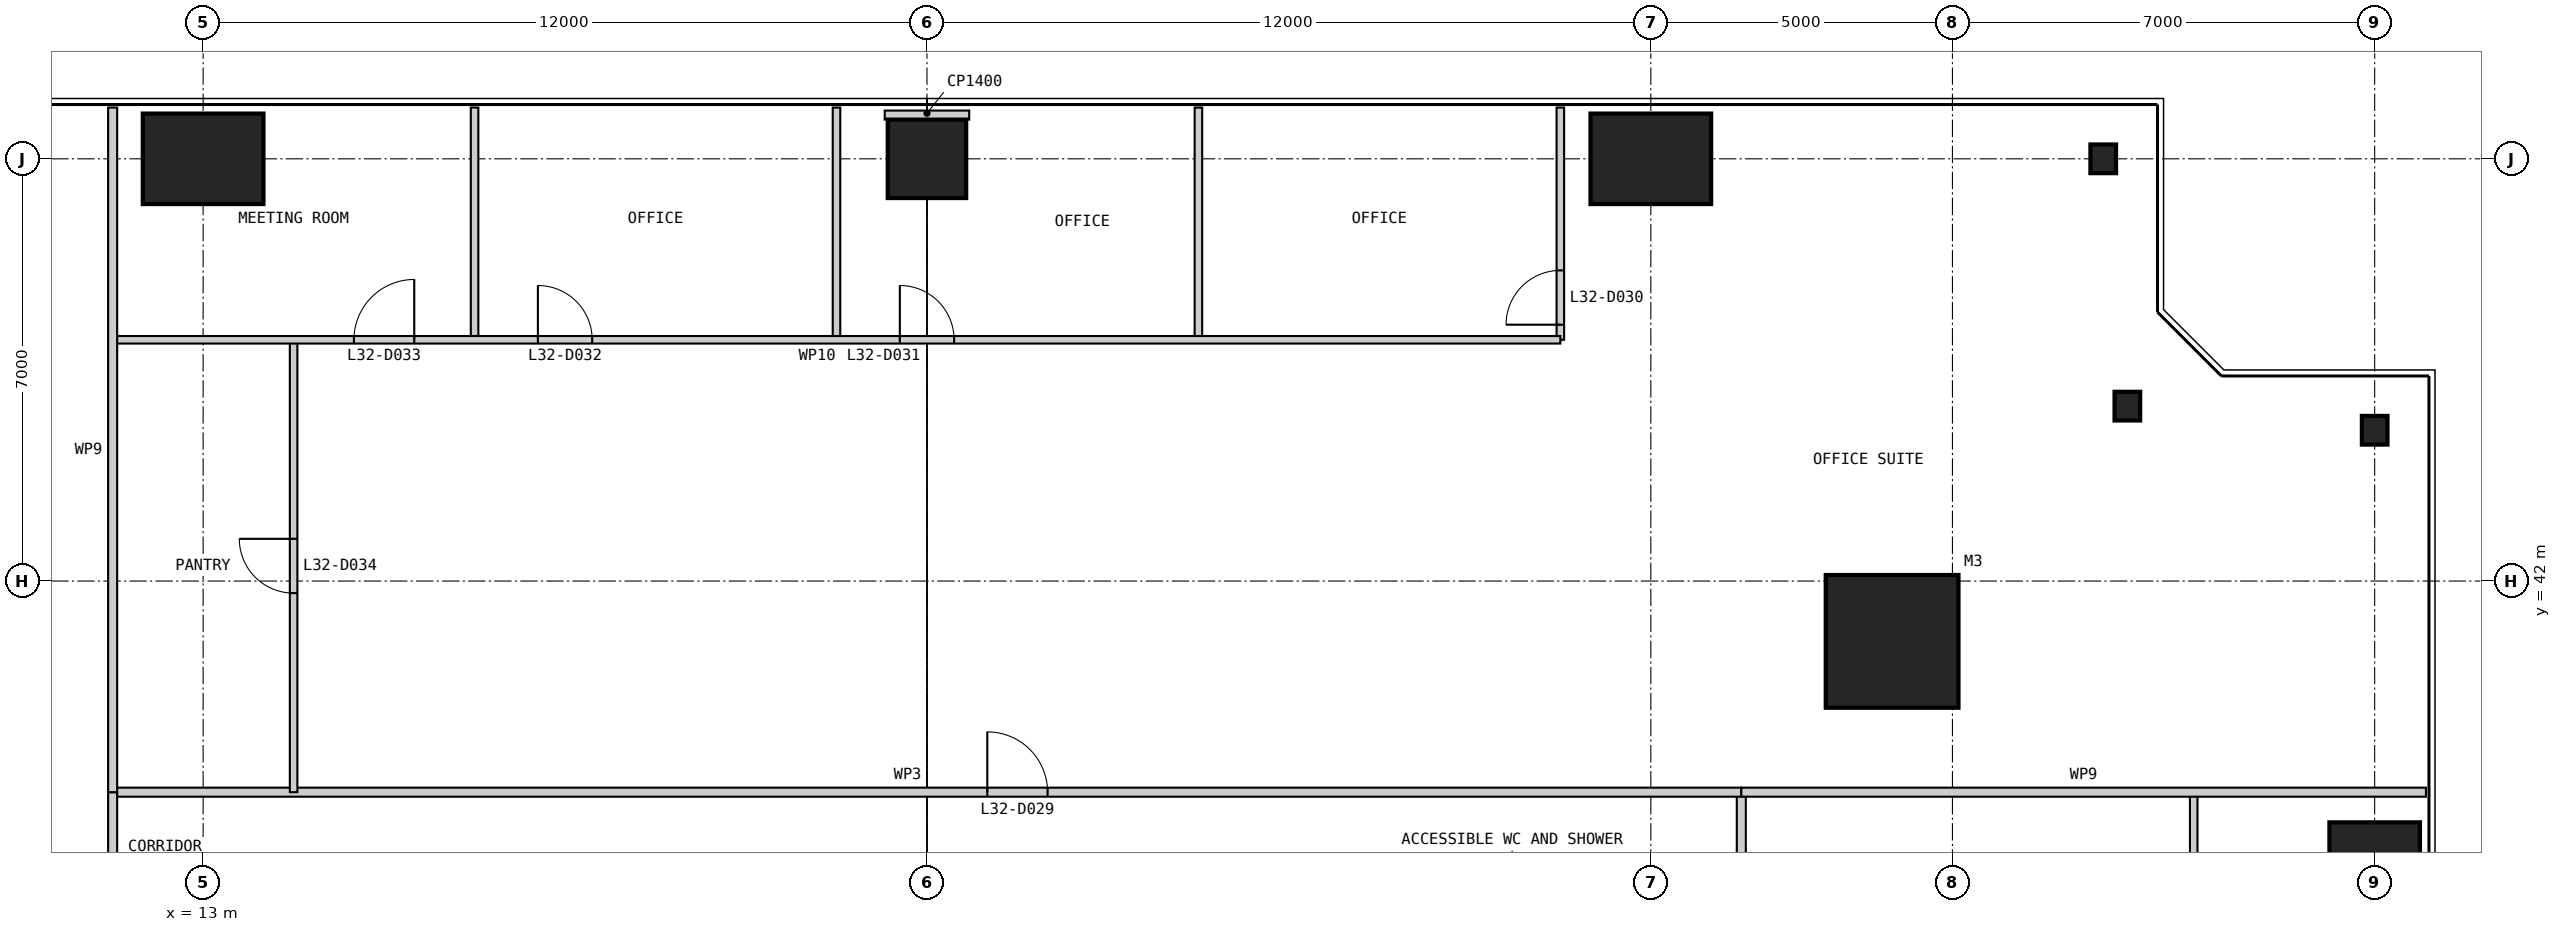
"""IFC4 building model, lengths in metres.
Left out: names, types, materials, properties, quantities, classifications, styles, units other than length and angle.
Written with IfcOpenShell. Run it as: python <this file> out.ifc"""

import sys

from ifc_helpers import new_model, si_unit, direction, frame, frame_2d, origin, origin_2d, place, context, subcontext, project, spatial, rectangle, i_section, extrude, element, fill, save


model = new_model("IFC4")
c1 = context("Model", 3, precision=1e-05, world=origin(), true_north=direction((0.0, 1.0)))
c2 = subcontext(c1, "Body", "Model", "MODEL_VIEW")
j1 = project(units=[si_unit("LENGTHUNIT", "METRE"), si_unit("PLANEANGLEUNIT", "RADIAN")], contexts=[c1])
p1 = place(None, origin())
s1 = spatial("IfcSite", under=j1, at=p1, CompositionType="ELEMENT")
p2 = place(p1, origin())
s2 = spatial("IfcBuilding", under=s1, at=p2, CompositionType="ELEMENT")
p3 = place(p2, frame((0.0, 0.0, 138.4)))
s3 = spatial("IfcBuildingStorey", under=s2, at=p3, CompositionType="ELEMENT", Elevation=138.4)
p4 = place(p3, frame((41.0, 41.0, 0.0), z_axis=(0.0, 0.0, 1.0), x_axis=(1.0, 0.0, 0.0)))
e1 = element("IfcColumn", 1, at=p4, inside=s3, PredefinedType="COLUMN", context=c2, shape_type="SweptSolid", body=[
    extrude(rectangle(XDim=2.2, YDim=2.2, at=origin_2d()), origin(), (0.0, 0.0, 1.0), 4.0),
])
p5 = place(p3, frame((49.0, 37.0, 0.0), z_axis=(0.0, 0.0, 1.0), x_axis=(1.0, 0.0, 0.0)))
e2 = element("IfcColumn", 2, at=p5, inside=s3, PredefinedType="COLUMN", context=c2, shape_type="SweptSolid", body=[
    extrude(rectangle(XDim=1.5, YDim=2.0, at=origin_2d()), origin(), (0.0, 0.0, 1.0), 4.0),
])
for number, where, z_axis, x_axis in (
    (3, (49.0, 44.5, 0.0), (0.0, 0.0, 1.0), (1.0, 0.0, 0.0)),
    (4, (44.9, 44.9, 0.0), (0.0, 0.0, 1.0), (1.0, 0.0, 0.0)),
    (5, (44.5, 49.0, 0.0), (0.0, 0.0, 1.0), (1.0, 0.0, 0.0)),
):
    element("IfcColumn", number, at=place(p3, frame(where, z_axis=z_axis, x_axis=x_axis)), inside=s3, PredefinedType="COLUMN", context=c2, shape_type="SweptSolid", body=[
        extrude(i_section(OverallWidth=0.424, OverallDepth=0.475, WebThickness=0.048, FlangeThickness=0.077, at=origin_2d()), origin(), (0.0, 0.0, 1.0), 4.0),
    ])
p6 = place(p3, frame((37.0, 49.0, 0.0), z_axis=(0.0, 0.0, 1.0), x_axis=(1.0, 0.0, 0.0)))
e6 = element("IfcColumn", 6, at=p6, inside=s3, PredefinedType="COLUMN", context=c2, shape_type="SweptSolid", body=[
    extrude(rectangle(XDim=2.0, YDim=1.5, at=origin_2d()), origin(), (0.0, 0.0, 1.0), 4.0),
])
p7 = place(p3, frame((25.0, 49.0, 0.0), z_axis=(0.0, 0.0, 1.0), x_axis=(1.0, 0.0, 0.0)))
e7 = element("IfcColumn", 7, at=p7, inside=s3, PredefinedType="COLUMN", context=c2, shape_type="SweptSolid", body=[
    extrude(rectangle(XDim=1.3, YDim=1.3, at=origin_2d()), origin(), (0.0, 0.0, 1.0), 4.0),
])
p8 = place(p3, frame((13.0, 49.0, 0.0), z_axis=(0.0, 0.0, 1.0), x_axis=(1.0, 0.0, 0.0)))
e8 = element("IfcColumn", 8, at=p8, inside=s3, PredefinedType="COLUMN", context=c2, shape_type="SweptSolid", body=[
    extrude(rectangle(XDim=2.0, YDim=1.5, at=origin_2d()), origin(), (0.0, 0.0, 1.0), 4.0),
])
p9 = place(p3, frame((38.5, 11.5, 0.0), z_axis=(0.0, 0.0, 1.0), x_axis=(0.0, 1.0, 0.0)))
e9 = element("IfcWall", 9, at=p9, inside=s3, PredefinedType="PARTITIONING", context=c2, shape_type="SweptSolid", body=[
    extrude(rectangle(XDim=27.0, YDim=0.15, at=frame_2d((13.5, 0.0))), origin(), (0.0, 0.0, 1.0), 3.85),
])
p10 = place(p9, frame((13.0, 0.0, 0.0)))
e10 = element("IfcOpeningElement", 10, at=p10, cuts=e9, PredefinedType="OPENING", context=c2, shape_type="SweptSolid", body=[
    extrude(rectangle(XDim=1.0, YDim=2.2, at=frame_2d((0.5, 1.1))), frame((0.0, 0.085, 0.0), z_axis=(0.0, -1.0, 0.0), x_axis=(1.0, 0.0, 0.0)), (0.0, 0.0, 1.0), 0.17),
])
p11 = place(p3, frame((46.0, 14.5, 0.0), z_axis=(0.0, 0.0, 1.0), x_axis=(0.0, 1.0, 0.0)))
e11 = element("IfcWall", 11, at=p11, inside=s3, PredefinedType="PARTITIONING", context=c2, shape_type="SweptSolid", body=[
    extrude(rectangle(XDim=24.0, YDim=0.125, at=frame_2d((12.0, 0.0))), origin(), (0.0, 0.0, 1.0), 3.238),
])
p12 = place(p11, frame((4.05, 0.0, 0.0)))
e12 = element("IfcOpeningElement", 12, at=p12, cuts=e11, PredefinedType="OPENING", context=c2, shape_type="SweptSolid", body=[
    extrude(rectangle(XDim=0.9, YDim=2.2, at=frame_2d((0.45, 1.1))), frame((0.0, 0.073, 0.0), z_axis=(0.0, -1.0, 0.0), x_axis=(1.0, 0.0, 0.0)), (0.0, 0.0, 1.0), 0.145),
])
p13 = place(p11, frame((10.05, 0.0, 0.0)))
e13 = element("IfcOpeningElement", 13, at=p13, cuts=e11, PredefinedType="OPENING", context=c2, shape_type="SweptSolid", body=[
    extrude(rectangle(XDim=0.9, YDim=2.2, at=frame_2d((0.45, 1.1))), frame((0.0, 0.073, 0.0), z_axis=(0.0, -1.0, 0.0), x_axis=(1.0, 0.0, 0.0)), (0.0, 0.0, 1.0), 0.145),
])
p14 = place(p11, frame((16.05, 0.0, 0.0)))
e14 = element("IfcOpeningElement", 14, at=p14, cuts=e11, PredefinedType="OPENING", context=c2, shape_type="SweptSolid", body=[
    extrude(rectangle(XDim=0.9, YDim=2.2, at=frame_2d((0.45, 1.1))), frame((0.0, 0.073, 0.0), z_axis=(0.0, -1.0, 0.0), x_axis=(1.0, 0.0, 0.0)), (0.0, 0.0, 1.0), 0.145),
])
p15 = place(p11, frame((19.05, 0.0, 0.0)))
e15 = element("IfcOpeningElement", 15, at=p15, cuts=e11, PredefinedType="OPENING", context=c2, shape_type="SweptSolid", body=[
    extrude(rectangle(XDim=0.9, YDim=2.2, at=frame_2d((0.45, 1.1))), frame((0.0, 0.073, 0.0), z_axis=(0.0, -1.0, 0.0), x_axis=(1.0, 0.0, 0.0)), (0.0, 0.0, 1.0), 0.145),
])
p16 = place(p3, frame((38.5, 38.5, 0.0), z_axis=(0.0, 0.0, 1.0), x_axis=(-1.0, 0.0, 0.0)))
e16 = element("IfcWall", 16, at=p16, inside=s3, PredefinedType="PARTITIONING", context=c2, shape_type="SweptSolid", body=[
    extrude(rectangle(XDim=27.0, YDim=0.15, at=frame_2d((13.5, 0.0))), origin(), (0.0, 0.0, 1.0), 3.85),
])
p17 = place(p16, frame((11.5, 0.0, 0.0)))
e17 = element("IfcOpeningElement", 17, at=p17, cuts=e16, PredefinedType="OPENING", context=c2, shape_type="SweptSolid", body=[
    extrude(rectangle(XDim=1.0, YDim=2.2, at=frame_2d((0.5, 1.1))), frame((0.0, 0.085, 0.0), z_axis=(0.0, -1.0, 0.0), x_axis=(1.0, 0.0, 0.0)), (0.0, 0.0, 1.0), 0.17),
])
p18 = place(p3, frame((49.85, 38.5, 0.0), z_axis=(0.0, 0.0, 1.0), x_axis=(-1.0, 0.0, 0.0)))
e18 = element("IfcWall", 18, at=p18, inside=s3, PredefinedType="PARTITIONING", context=c2, shape_type="SweptSolid", body=[
    extrude(rectangle(XDim=11.35, YDim=0.15, at=frame_2d((5.675, 0.0))), origin(), (0.0, 0.0, 1.0), 3.85),
])
p19 = place(p3, frame((35.5, 49.85, 0.0), z_axis=(0.0, 0.0, 1.0), x_axis=(0.0, -1.0, 0.0)))
e19 = element("IfcWall", 19, at=p19, inside=s3, PredefinedType="PARTITIONING", context=c2, shape_type="SweptSolid", body=[
    extrude(rectangle(XDim=3.85, YDim=0.125, at=frame_2d((1.925, 0.0))), origin(), (0.0, 0.0, 1.0), 3.85),
])
p20 = place(p19, frame((2.7, 0.0, 0.0)))
e20 = element("IfcOpeningElement", 20, at=p20, cuts=e19, PredefinedType="OPENING", context=c2, shape_type="SweptSolid", body=[
    extrude(rectangle(XDim=0.9, YDim=2.2, at=frame_2d((0.45, 1.1))), frame((0.0, 0.073, 0.0), z_axis=(0.0, -1.0, 0.0), x_axis=(1.0, 0.0, 0.0)), (0.0, 0.0, 1.0), 0.145),
])
for number, where, z_axis, x_axis in (
    (21, (29.5, 49.85, 0.0), (0.0, 0.0, 1.0), (0.0, -1.0, 0.0)),
    (22, (23.5, 49.85, 0.0), (0.0, 0.0, 1.0), (0.0, -1.0, 0.0)),
    (23, (17.5, 49.85, 0.0), (0.0, 0.0, 1.0), (0.0, -1.0, 0.0)),
):
    element("IfcWall", number, at=place(p3, frame(where, z_axis=z_axis, x_axis=x_axis)), inside=s3, PredefinedType="PARTITIONING", context=c2, shape_type="SweptSolid", body=[
        extrude(rectangle(XDim=3.85, YDim=0.125, at=frame_2d((1.925, 0.0))), origin(), (0.0, 0.0, 1.0), 3.85),
    ])
p21 = place(p3, frame((14.5, 46.0, 0.0), z_axis=(0.0, 0.0, 1.0), x_axis=(0.0, -1.0, 0.0)))
e24 = element("IfcWall", 24, at=p21, inside=s3, PredefinedType="PARTITIONING", context=c2, shape_type="SweptSolid", body=[
    extrude(rectangle(XDim=7.5, YDim=0.125, at=frame_2d((3.75, 0.0))), origin(), (0.0, 0.0, 1.0), 3.85),
])
p22 = place(p21, frame((3.3, 0.0, 0.0)))
e25 = element("IfcOpeningElement", 25, at=p22, cuts=e24, PredefinedType="OPENING", context=c2, shape_type="SweptSolid", body=[
    extrude(rectangle(XDim=0.9, YDim=2.2, at=frame_2d((0.45, 1.1))), frame((0.0, 0.073, 0.0), z_axis=(0.0, -1.0, 0.0), x_axis=(1.0, 0.0, 0.0)), (0.0, 0.0, 1.0), 0.145),
])
p23 = place(p3, frame((35.5, 46.0, 0.0), z_axis=(0.0, 0.0, 1.0), x_axis=(-1.0, 0.0, 0.0)))
e26 = element("IfcWall", 26, at=p23, inside=s3, PredefinedType="PARTITIONING", context=c2, shape_type="SweptSolid", body=[
    extrude(rectangle(XDim=24.0, YDim=0.125, at=frame_2d((12.0, 0.0))), origin(), (0.0, 0.0, 1.0), 3.85),
])
p24 = place(p23, frame((10.05, 0.0, 0.0)))
e27 = element("IfcOpeningElement", 27, at=p24, cuts=e26, PredefinedType="OPENING", context=c2, shape_type="SweptSolid", body=[
    extrude(rectangle(XDim=0.9, YDim=2.2, at=frame_2d((0.45, 1.1))), frame((0.0, 0.073, 0.0), z_axis=(0.0, -1.0, 0.0), x_axis=(1.0, 0.0, 0.0)), (0.0, 0.0, 1.0), 0.145),
])
p25 = place(p23, frame((16.05, 0.0, 0.0)))
e28 = element("IfcOpeningElement", 28, at=p25, cuts=e26, PredefinedType="OPENING", context=c2, shape_type="SweptSolid", body=[
    extrude(rectangle(XDim=0.9, YDim=2.2, at=frame_2d((0.45, 1.1))), frame((0.0, 0.073, 0.0), z_axis=(0.0, -1.0, 0.0), x_axis=(1.0, 0.0, 0.0)), (0.0, 0.0, 1.0), 0.145),
])
p26 = place(p23, frame((19.0, 0.0, 0.0)))
e29 = element("IfcOpeningElement", 29, at=p26, cuts=e26, PredefinedType="OPENING", context=c2, shape_type="SweptSolid", body=[
    extrude(rectangle(XDim=1.0, YDim=2.2, at=frame_2d((0.5, 1.1))), frame((0.0, 0.073, 0.0), z_axis=(0.0, -1.0, 0.0), x_axis=(1.0, 0.0, 0.0)), (0.0, 0.0, 1.0), 0.145),
])
p27 = place(p3, frame((11.5, 38.5, 0.0), z_axis=(0.0, 0.0, 1.0), x_axis=(0.0, -1.0, 0.0)))
e30 = element("IfcWall", 30, at=p27, inside=s3, PredefinedType="PARTITIONING", context=c2, shape_type="SweptSolid", body=[
    extrude(rectangle(XDim=27.0, YDim=0.15, at=frame_2d((13.5, 0.0))), origin(), (0.0, 0.0, 1.0), 3.85),
])
p28 = place(p27, frame((2.5, 0.0, 0.0)))
e31 = element("IfcOpeningElement", 31, at=p28, cuts=e30, PredefinedType="OPENING", context=c2, shape_type="SweptSolid", body=[
    extrude(rectangle(XDim=1.0, YDim=2.2, at=frame_2d((0.5, 1.1))), frame((0.0, 0.085, 0.0), z_axis=(0.0, -1.0, 0.0), x_axis=(1.0, 0.0, 0.0)), (0.0, 0.0, 1.0), 0.17),
])
p29 = place(p27, frame((16.0, 0.0, 0.0)))
e32 = element("IfcOpeningElement", 32, at=p29, cuts=e30, PredefinedType="OPENING", context=c2, shape_type="SweptSolid", body=[
    extrude(rectangle(XDim=1.0, YDim=2.2, at=frame_2d((0.5, 1.1))), frame((0.0, 0.085, 0.0), z_axis=(0.0, -1.0, 0.0), x_axis=(1.0, 0.0, 0.0)), (0.0, 0.0, 1.0), 0.17),
])
p30 = place(p3, frame((11.5, 49.85, 0.0), z_axis=(0.0, 0.0, 1.0), x_axis=(0.0, -1.0, 0.0)))
e33 = element("IfcWall", 33, at=p30, inside=s3, PredefinedType="PARTITIONING", context=c2, shape_type="SweptSolid", body=[
    extrude(rectangle(XDim=11.35, YDim=0.15, at=frame_2d((5.675, 0.0))), origin(), (0.0, 0.0, 1.0), 3.85),
])
p31 = place(p3, frame((25.0, 49.8, 0.0), z_axis=(0.0, 0.0, 1.0), x_axis=(0.0, -1.0, 0.0)))
e34 = element("IfcWall", 34, at=p31, inside=s3, PredefinedType="PARTITIONING", context=c2, shape_type="SweptSolid", body=[
    extrude(rectangle(XDim=0.15, YDim=1.4, at=frame_2d((0.075, 0.0))), origin(), (0.0, 0.0, 1.0), 3.85),
])
p32 = place(p17, frame((1.0, 0.0, 0.0), z_axis=(0.0, 0.0, 1.0), x_axis=(-1.0, 0.0, 0.0)))
e35 = element("IfcDoor", 35, at=p32, inside=s3, OperationType="SINGLE_SWING_LEFT", PredefinedType="DOOR", context=c2, shape_type="SweptSolid", body=[
    extrude(rectangle(XDim=1.0, YDim=2.2, at=frame_2d((0.5, 1.1))), frame((0.0, 0.025, 0.0), z_axis=(0.0, -1.0, 0.0), x_axis=(1.0, 0.0, 0.0)), (0.0, 0.0, 1.0), 0.05),
])
fill(e17, e35)
p33 = place(p20, frame((0.9, 0.0, 0.0), z_axis=(0.0, 0.0, 1.0), x_axis=(-1.0, 0.0, 0.0)))
e36 = element("IfcDoor", 36, at=p33, inside=s3, OperationType="SINGLE_SWING_LEFT", PredefinedType="DOOR", context=c2, shape_type="SweptSolid", body=[
    extrude(rectangle(XDim=0.9, YDim=2.2, at=frame_2d((0.45, 1.1))), frame((0.0, 0.025, 0.0), z_axis=(0.0, -1.0, 0.0), x_axis=(1.0, 0.0, 0.0)), (0.0, 0.0, 1.0), 0.05),
])
fill(e20, e36)
p34 = place(p24, frame((0.9, 0.0, 0.0), z_axis=(0.0, 0.0, 1.0), x_axis=(-1.0, 0.0, 0.0)))
e37 = element("IfcDoor", 37, at=p34, inside=s3, OperationType="SINGLE_SWING_LEFT", PredefinedType="DOOR", context=c2, shape_type="SweptSolid", body=[
    extrude(rectangle(XDim=0.9, YDim=2.2, at=frame_2d((0.45, 1.1))), frame((0.0, 0.025, 0.0), z_axis=(0.0, -1.0, 0.0), x_axis=(1.0, 0.0, 0.0)), (0.0, 0.0, 1.0), 0.05),
])
fill(e27, e37)
p35 = place(p25, frame((0.9, 0.0, 0.0), z_axis=(0.0, 0.0, 1.0), x_axis=(-1.0, 0.0, 0.0)))
e38 = element("IfcDoor", 38, at=p35, inside=s3, OperationType="SINGLE_SWING_LEFT", PredefinedType="DOOR", context=c2, shape_type="SweptSolid", body=[
    extrude(rectangle(XDim=0.9, YDim=2.2, at=frame_2d((0.45, 1.1))), frame((0.0, 0.025, 0.0), z_axis=(0.0, -1.0, 0.0), x_axis=(1.0, 0.0, 0.0)), (0.0, 0.0, 1.0), 0.05),
])
fill(e28, e38)
p36 = place(p26, frame((1.0, 0.0, 0.0), z_axis=(0.0, 0.0, 1.0), x_axis=(-1.0, 0.0, 0.0)))
e39 = element("IfcDoor", 39, at=p36, inside=s3, OperationType="SINGLE_SWING_RIGHT", PredefinedType="DOOR", context=c2, shape_type="SweptSolid", body=[
    extrude(rectangle(XDim=1.0, YDim=2.2, at=frame_2d((0.5, 1.1))), frame((0.0, 0.025, 0.0), z_axis=(0.0, -1.0, 0.0), x_axis=(1.0, 0.0, 0.0)), (0.0, 0.0, 1.0), 0.05),
])
fill(e29, e39)
p37 = place(p22, frame((0.9, 0.0, 0.0), z_axis=(0.0, 0.0, 1.0), x_axis=(-1.0, 0.0, 0.0)))
e40 = element("IfcDoor", 40, at=p37, inside=s3, OperationType="SINGLE_SWING_RIGHT", PredefinedType="DOOR", context=c2, shape_type="SweptSolid", body=[
    extrude(rectangle(XDim=0.9, YDim=2.2, at=frame_2d((0.45, 1.1))), frame((0.0, 0.025, 0.0), z_axis=(0.0, -1.0, 0.0), x_axis=(1.0, 0.0, 0.0)), (0.0, 0.0, 1.0), 0.05),
])
fill(e25, e40)
save(model, sys.argv[1])
